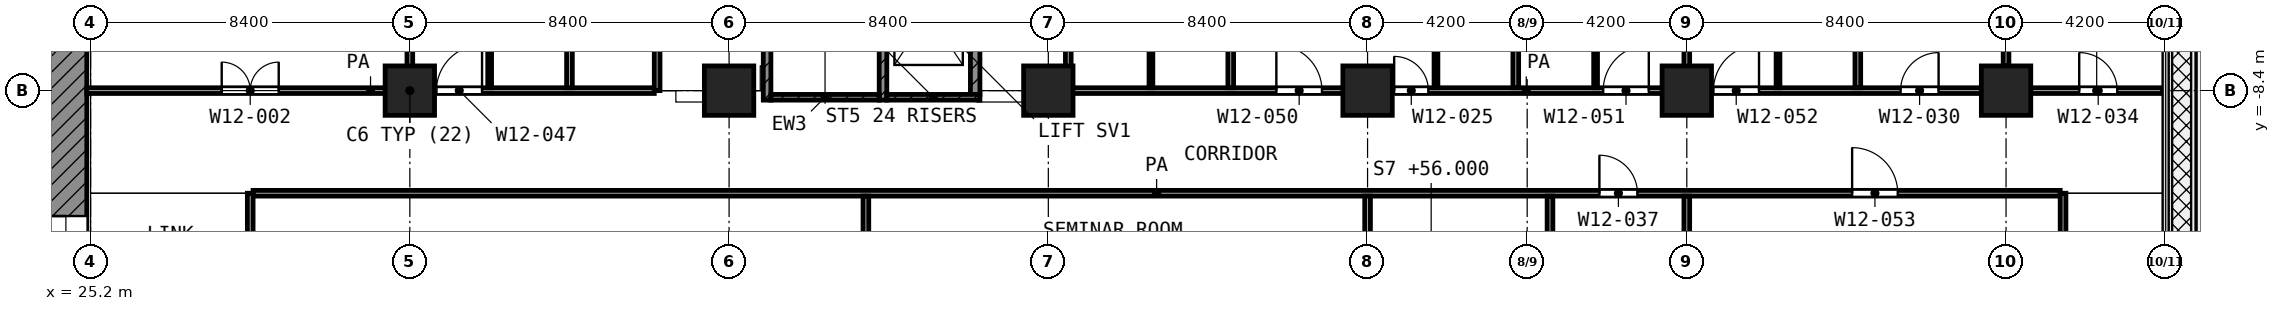
"""IFC4 building model, lengths in metres.
Left out: names, types, materials, properties, quantities, classifications, styles, units other than length and angle.
Written with IfcOpenShell. Run it as: python <this file> out.ifc"""

import sys

from ifc_helpers import new_model, si_unit, direction, frame, frame_2d, origin, origin_2d, place, context, subcontext, project, spatial, rectangle, extrude, element, fill, save


model = new_model("IFC4")
c1 = context("Model", 3, precision=1e-05, world=origin(), true_north=direction((0.0, 1.0)))
c2 = subcontext(c1, "Body", "Model", "MODEL_VIEW")
j1 = project(units=[si_unit("LENGTHUNIT", "METRE"), si_unit("PLANEANGLEUNIT", "RADIAN")], contexts=[c1])
p1 = place(None, origin())
s1 = spatial("IfcSite", under=j1, at=p1, CompositionType="ELEMENT")
p2 = place(p1, origin())
s2 = spatial("IfcBuilding", under=s1, at=p2, CompositionType="ELEMENT")
p3 = place(p2, frame((0.0, 0.0, 56.0)))
s3 = spatial("IfcBuildingStorey", under=s2, at=p3, CompositionType="ELEMENT", Elevation=56.0)
for number, where, z_axis, x_axis in (
    (1, (33.6, -8.4, 0.0), (0.0, 0.0, 1.0), (1.0, 0.0, 0.0)),
    (2, (42.0, -8.4, 0.0), (0.0, 0.0, 1.0), (1.0, 0.0, 0.0)),
    (3, (50.4, -8.4, 0.0), (0.0, 0.0, 1.0), (1.0, 0.0, 0.0)),
    (4, (58.8, -8.4, 0.0), (0.0, 0.0, 1.0), (1.0, 0.0, 0.0)),
    (5, (67.2, -8.4, 0.0), (0.0, 0.0, 1.0), (1.0, 0.0, 0.0)),
    (6, (75.6, -8.4, 0.0), (0.0, 0.0, 1.0), (1.0, 0.0, 0.0)),
):
    element("IfcColumn", number, at=place(p3, frame(where, z_axis=z_axis, x_axis=x_axis)), inside=s3, PredefinedType="COLUMN", context=c2, shape_type="SweptSolid", body=[
        extrude(rectangle(XDim=1.3, YDim=1.3, at=origin_2d()), origin(), (0.0, 0.0, 1.0), 4.2),
    ])
p4 = place(p3, frame((24.55, -24.0, 0.0), z_axis=(0.0, 0.0, 1.0), x_axis=(0.0, 1.0, 0.0)))
e7 = element("IfcWall", 7, at=p4, inside=s3, PredefinedType="SHEAR", context=c2, shape_type="SweptSolid", body=[
    extrude(rectangle(XDim=18.6, YDim=1.1, at=frame_2d((9.3, 0.0))), origin(), (0.0, 0.0, 1.0), 3.9),
])
p5 = place(p4, frame((10.5, 0.0, 0.0)))
e8 = element("IfcOpeningElement", 8, at=p5, cuts=e7, PredefinedType="OPENING", context=c2, shape_type="SweptSolid", body=[
    extrude(rectangle(XDim=1.8, YDim=2.1, at=frame_2d((0.9, 1.05))), frame((0.0, 0.56, 0.0), z_axis=(0.0, -1.0, 0.0), x_axis=(1.0, 0.0, 0.0)), (0.0, 0.0, 1.0), 1.12),
])
p6 = place(p3, frame((43.0, -8.65, 0.0), z_axis=(0.0, 0.0, 1.0), x_axis=(0.0, 1.0, 0.0)))
e9 = element("IfcWall", 9, at=p6, inside=s3, PredefinedType="SHEAR", context=c2, shape_type="SweptSolid", body=[
    extrude(rectangle(XDim=8.35, YDim=0.2, at=frame_2d((4.175, 0.0))), origin(), (0.0, 0.0, 1.0), 3.9),
])
p7 = place(p6, frame((7.0, 0.0, 0.0)))
e10 = element("IfcOpeningElement", 10, at=p7, cuts=e9, PredefinedType="OPENING", context=c2, shape_type="SweptSolid", body=[
    extrude(rectangle(XDim=1.1, YDim=2.1, at=frame_2d((0.55, 1.05))), frame((0.0, 0.11, 0.0), z_axis=(0.0, -1.0, 0.0), x_axis=(1.0, 0.0, 0.0)), (0.0, 0.0, 1.0), 0.22),
])
p8 = place(p3, frame((46.05, -8.65, 0.0), z_axis=(0.0, 0.0, 1.0), x_axis=(0.0, 1.0, 0.0)))
e11 = element("IfcWall", 11, at=p8, inside=s3, PredefinedType="SHEAR", context=c2, shape_type="SweptSolid", body=[
    extrude(rectangle(XDim=8.35, YDim=0.2, at=frame_2d((4.175, 0.0))), origin(), (0.0, 0.0, 1.0), 3.9),
])
p9 = place(p8, frame((7.0, 0.0, 0.0)))
e12 = element("IfcOpeningElement", 12, at=p9, cuts=e11, PredefinedType="OPENING", context=c2, shape_type="SweptSolid", body=[
    extrude(rectangle(XDim=1.1, YDim=2.1, at=frame_2d((0.55, 1.05))), frame((0.0, 0.11, 0.0), z_axis=(0.0, -1.0, 0.0), x_axis=(1.0, 0.0, 0.0)), (0.0, 0.0, 1.0), 0.22),
])
p10 = place(p3, frame((43.1, -8.575, 0.0), z_axis=(0.0, 0.0, 1.0), x_axis=(1.0, 0.0, 0.0)))
e13 = element("IfcWall", 13, at=p10, inside=s3, PredefinedType="SHEAR", context=c2, shape_type="SweptSolid", body=[
    extrude(rectangle(XDim=2.85, YDim=0.15, at=frame_2d((1.425, 0.0))), origin(), (0.0, 0.0, 1.0), 3.9),
])
p11 = place(p3, frame((46.15, -8.575, 0.0), z_axis=(0.0, 0.0, 1.0), x_axis=(1.0, 0.0, 0.0)))
e14 = element("IfcWall", 14, at=p11, inside=s3, PredefinedType="SHEAR", context=c2, shape_type="SweptSolid", body=[
    extrude(rectangle(XDim=2.45, YDim=0.15, at=frame_2d((1.225, 0.0))), origin(), (0.0, 0.0, 1.0), 3.9),
])
p12 = place(p3, frame((48.475, -8.5, 0.0), z_axis=(0.0, 0.0, 1.0), x_axis=(0.0, 1.0, 0.0)))
e15 = element("IfcWall", 15, at=p12, inside=s3, PredefinedType="SHEAR", context=c2, shape_type="SweptSolid", body=[
    extrude(rectangle(XDim=3.475, YDim=0.25, at=frame_2d((1.738, 0.0))), origin(), (0.0, 0.0, 1.0), 3.9),
])
for number, where, z_axis, x_axis in (
    (16, (35.7, -8.325, 0.0), (0.0, 0.0, 1.0), (0.0, 1.0, 0.0)),
    (17, (53.1, -8.325, 0.0), (0.0, 0.0, 1.0), (0.0, 1.0, 0.0)),
):
    element("IfcWall", number, at=place(p3, frame(where, z_axis=z_axis, x_axis=x_axis)), inside=s3, PredefinedType="PARTITIONING", context=c2, shape_type="SweptSolid", body=[
        extrude(rectangle(XDim=2.625, YDim=0.1, at=frame_2d((1.312, 0.0))), origin(), (0.0, 0.0, 1.0), 3.9),
    ])
p13 = place(p3, frame((60.6, -8.325, 0.0), z_axis=(0.0, 0.0, 1.0), x_axis=(0.0, 1.0, 0.0)))
e18 = element("IfcWall", 18, at=p13, inside=s3, PredefinedType="PARTITIONING", context=c2, shape_type="SweptSolid", body=[
    extrude(rectangle(XDim=2.624, YDim=0.1, at=frame_2d((1.312, 0.0))), origin(), (0.0, 0.0, 1.0), 3.9),
])
for number, where, z_axis, x_axis in (
    (19, (64.8, -8.325, 0.0), (0.0, 0.0, 1.0), (0.0, 1.0, 0.0)),
    (20, (69.6, -8.325, 0.0), (0.0, 0.0, 1.0), (0.0, 1.0, 0.0)),
):
    element("IfcWall", number, at=place(p3, frame(where, z_axis=z_axis, x_axis=x_axis)), inside=s3, PredefinedType="PARTITIONING", context=c2, shape_type="SweptSolid", body=[
        extrude(rectangle(XDim=2.625, YDim=0.1, at=frame_2d((1.312, 0.0))), origin(), (0.0, 0.0, 1.0), 3.9),
    ])
p14 = place(p3, frame((29.475, -11.1, 0.0), z_axis=(0.0, 0.0, 1.0), x_axis=(1.0, 0.0, 0.0)))
e21 = element("IfcWall", 21, at=p14, inside=s3, PredefinedType="PARTITIONING", context=c2, shape_type="SweptSolid", body=[
    extrude(rectangle(XDim=47.55, YDim=0.15, at=frame_2d((23.775, 0.0))), origin(), (0.0, 0.0, 1.0), 3.9),
])
p15 = place(p14, frame((35.425, 0.0, 0.0)))
e22 = element("IfcOpeningElement", 22, at=p15, cuts=e21, PredefinedType="OPENING", context=c2, shape_type="SweptSolid", body=[
    extrude(rectangle(XDim=1.0, YDim=2.1, at=frame_2d((0.5, 1.05))), frame((0.0, 0.085, 0.0), z_axis=(0.0, -1.0, 0.0), x_axis=(1.0, 0.0, 0.0)), (0.0, 0.0, 1.0), 0.17),
])
p16 = place(p14, frame((42.075, 0.0, 0.0)))
e23 = element("IfcOpeningElement", 23, at=p16, cuts=e21, PredefinedType="OPENING", context=c2, shape_type="SweptSolid", body=[
    extrude(rectangle(XDim=1.2, YDim=2.1, at=frame_2d((0.6, 1.05))), frame((0.0, 0.085, 0.0), z_axis=(0.0, -1.0, 0.0), x_axis=(1.0, 0.0, 0.0)), (0.0, 0.0, 1.0), 0.17),
])
p17 = place(p3, frame((25.1, -8.4, 0.0), z_axis=(0.0, 0.0, 1.0), x_axis=(1.0, 0.0, 0.0)))
e24 = element("IfcWall", 24, at=p17, inside=s3, PredefinedType="PARTITIONING", context=c2, shape_type="SweptSolid", body=[
    extrude(rectangle(XDim=14.932, YDim=0.15, at=frame_2d((7.466, 0.0))), origin(), (0.0, 0.0, 1.0), 3.9),
])
p18 = place(p17, frame((3.55, 0.0, 0.0)))
e25 = element("IfcOpeningElement", 25, at=p18, cuts=e24, PredefinedType="OPENING", context=c2, shape_type="SweptSolid", body=[
    extrude(rectangle(XDim=1.5, YDim=2.1, at=frame_2d((0.75, 1.05))), frame((0.0, 0.085, 0.0), z_axis=(0.0, -1.0, 0.0), x_axis=(1.0, 0.0, 0.0)), (0.0, 0.0, 1.0), 0.17),
])
p19 = place(p17, frame((9.2, 0.0, 0.0)))
e26 = element("IfcOpeningElement", 26, at=p19, cuts=e24, PredefinedType="OPENING", context=c2, shape_type="SweptSolid", body=[
    extrude(rectangle(XDim=1.2, YDim=2.1, at=frame_2d((0.6, 1.05))), frame((0.0, 0.085, 0.0), z_axis=(0.0, -1.0, 0.0), x_axis=(1.0, 0.0, 0.0)), (0.0, 0.0, 1.0), 0.17),
])
p20 = place(p3, frame((51.0, -8.4, 0.0), z_axis=(0.0, 0.0, 1.0), x_axis=(1.0, 0.0, 0.0)))
e27 = element("IfcWall", 27, at=p20, inside=s3, PredefinedType="PARTITIONING", context=c2, shape_type="SweptSolid", body=[
    extrude(rectangle(XDim=23.95, YDim=0.15, at=frame_2d((11.975, 0.0))), origin(), (0.0, 0.0, 1.0), 3.9),
])
p21 = place(p20, frame((5.4, 0.0, 0.0)))
e28 = element("IfcOpeningElement", 28, at=p21, cuts=e27, PredefinedType="OPENING", context=c2, shape_type="SweptSolid", body=[
    extrude(rectangle(XDim=1.2, YDim=2.1, at=frame_2d((0.6, 1.05))), frame((0.0, 0.085, 0.0), z_axis=(0.0, -1.0, 0.0), x_axis=(1.0, 0.0, 0.0)), (0.0, 0.0, 1.0), 0.17),
])
p22 = place(p20, frame((8.5, 0.0, 0.0)))
e29 = element("IfcOpeningElement", 29, at=p22, cuts=e27, PredefinedType="OPENING", context=c2, shape_type="SweptSolid", body=[
    extrude(rectangle(XDim=0.9, YDim=2.1, at=frame_2d((0.45, 1.05))), frame((0.0, 0.085, 0.0), z_axis=(0.0, -1.0, 0.0), x_axis=(1.0, 0.0, 0.0)), (0.0, 0.0, 1.0), 0.17),
])
p23 = place(p20, frame((14.0, 0.0, 0.0)))
e30 = element("IfcOpeningElement", 30, at=p23, cuts=e27, PredefinedType="OPENING", context=c2, shape_type="SweptSolid", body=[
    extrude(rectangle(XDim=1.2, YDim=2.1, at=frame_2d((0.6, 1.05))), frame((0.0, 0.085, 0.0), z_axis=(0.0, -1.0, 0.0), x_axis=(1.0, 0.0, 0.0)), (0.0, 0.0, 1.0), 0.17),
])
p24 = place(p20, frame((16.9, 0.0, 0.0)))
e31 = element("IfcOpeningElement", 31, at=p24, cuts=e27, PredefinedType="OPENING", context=c2, shape_type="SweptSolid", body=[
    extrude(rectangle(XDim=1.2, YDim=2.1, at=frame_2d((0.6, 1.05))), frame((0.0, 0.085, 0.0), z_axis=(0.0, -1.0, 0.0), x_axis=(1.0, 0.0, 0.0)), (0.0, 0.0, 1.0), 0.17),
])
p25 = place(p20, frame((21.825, 0.0, 0.0)))
e32 = element("IfcOpeningElement", 32, at=p25, cuts=e27, PredefinedType="OPENING", context=c2, shape_type="SweptSolid", body=[
    extrude(rectangle(XDim=1.0, YDim=2.1, at=frame_2d((0.5, 1.05))), frame((0.0, 0.085, 0.0), z_axis=(0.0, -1.0, 0.0), x_axis=(1.0, 0.0, 0.0)), (0.0, 0.0, 1.0), 0.17),
])
p26 = place(p3, frame((76.25, -8.4, 0.0), z_axis=(0.0, 0.0, 1.0), x_axis=(1.0, 0.0, 0.0)))
e33 = element("IfcWall", 33, at=p26, inside=s3, PredefinedType="PARTITIONING", context=c2, shape_type="SweptSolid", body=[
    extrude(rectangle(XDim=3.47, YDim=0.15, at=frame_2d((1.735, 0.0))), origin(), (0.0, 0.0, 1.0), 3.9),
])
p27 = place(p26, frame((1.275, 0.0, 0.0)))
e34 = element("IfcOpeningElement", 34, at=p27, cuts=e33, PredefinedType="OPENING", context=c2, shape_type="SweptSolid", body=[
    extrude(rectangle(XDim=1.0, YDim=2.1, at=frame_2d((0.5, 1.05))), frame((0.0, 0.085, 0.0), z_axis=(0.0, -1.0, 0.0), x_axis=(1.0, 0.0, 0.0)), (0.0, 0.0, 1.0), 0.17),
])
p28 = place(p3, frame((29.4, -14.1, 0.0), z_axis=(0.0, 0.0, 1.0), x_axis=(0.0, 1.0, 0.0)))
e35 = element("IfcWall", 35, at=p28, inside=s3, PredefinedType="PARTITIONING", context=c2, shape_type="SweptSolid", body=[
    extrude(rectangle(XDim=3.0, YDim=0.15, at=frame_2d((1.5, 0.0))), origin(), (0.0, 0.0, 1.0), 3.9),
])
for number, where, z_axis, x_axis in (
    (36, (33.6, -8.325, 0.0), (0.0, 0.0, 1.0), (0.0, 1.0, 0.0)),
    (37, (37.8, -8.325, 0.0), (0.0, 0.0, 1.0), (0.0, 1.0, 0.0)),
):
    element("IfcWall", number, at=place(p3, frame(where, z_axis=z_axis, x_axis=x_axis)), inside=s3, PredefinedType="PARTITIONING", context=c2, shape_type="SweptSolid", body=[
        extrude(rectangle(XDim=8.245, YDim=0.15, at=frame_2d((4.123, 0.0))), origin(), (0.0, 0.0, 1.0), 3.9),
    ])
p29 = place(p3, frame((40.107, -8.4, 0.0), z_axis=(0.0, 0.0, 1.0), x_axis=(0.0, 1.0, 0.0)))
e38 = element("IfcWall", 38, at=p29, inside=s3, PredefinedType="PARTITIONING", context=c2, shape_type="SweptSolid", body=[
    extrude(rectangle(XDim=8.048, YDim=0.15, at=frame_2d((4.024, 0.0))), origin(), (0.0, 0.0, 1.0), 3.9),
])
p30 = place(p29, frame((3.524, 0.0, 0.0)))
e39 = element("IfcOpeningElement", 39, at=p30, cuts=e38, PredefinedType="OPENING", context=c2, shape_type="SweptSolid", body=[
    extrude(rectangle(XDim=1.0, YDim=2.1, at=frame_2d((0.5, 1.05))), frame((0.0, 0.085, 0.0), z_axis=(0.0, -1.0, 0.0), x_axis=(1.0, 0.0, 0.0)), (0.0, 0.0, 1.0), 0.17),
])
p31 = place(p3, frame((45.6, -14.025, 0.0), z_axis=(0.0, 0.0, 1.0), x_axis=(0.0, 1.0, 0.0)))
e40 = element("IfcWall", 40, at=p31, inside=s3, PredefinedType="PARTITIONING", context=c2, shape_type="SweptSolid", body=[
    extrude(rectangle(XDim=2.85, YDim=0.15, at=frame_2d((1.425, 0.0))), origin(), (0.0, 0.0, 1.0), 3.9),
])
p32 = place(p3, frame((50.925, -8.4, 0.0), z_axis=(0.0, 0.0, 1.0), x_axis=(0.0, 1.0, 0.0)))
e41 = element("IfcWall", 41, at=p32, inside=s3, PredefinedType="PARTITIONING", context=c2, shape_type="SweptSolid", body=[
    extrude(rectangle(XDim=6.55, YDim=0.15, at=frame_2d((3.275, 0.0))), origin(), (0.0, 0.0, 1.0), 3.9),
])
p33 = place(p32, frame((3.767, 0.0, 0.0)))
e42 = element("IfcOpeningElement", 42, at=p33, cuts=e41, PredefinedType="OPENING", context=c2, shape_type="SweptSolid", body=[
    extrude(rectangle(XDim=1.2, YDim=2.1, at=frame_2d((0.6, 1.05))), frame((0.0, 0.085, 0.0), z_axis=(0.0, -1.0, 0.0), x_axis=(1.0, 0.0, 0.0)), (0.0, 0.0, 1.0), 0.17),
])
p34 = place(p32, frame((1.583, 0.0, 0.0)))
e43 = element("IfcOpeningElement", 43, at=p34, cuts=e41, PredefinedType="OPENING", context=c2, shape_type="SweptSolid", body=[
    extrude(rectangle(XDim=1.2, YDim=2.1, at=frame_2d((0.6, 1.05))), frame((0.0, 0.085, 0.0), z_axis=(0.0, -1.0, 0.0), x_axis=(1.0, 0.0, 0.0)), (0.0, 0.0, 1.0), 0.17),
])
p35 = place(p3, frame((55.2, -8.325, 0.0), z_axis=(0.0, 0.0, 1.0), x_axis=(0.0, 1.0, 0.0)))
e44 = element("IfcWall", 44, at=p35, inside=s3, PredefinedType="PARTITIONING", context=c2, shape_type="SweptSolid", body=[
    extrude(rectangle(XDim=8.245, YDim=0.15, at=frame_2d((4.123, 0.0))), origin(), (0.0, 0.0, 1.0), 3.9),
])
p36 = place(p3, frame((58.8, -14.025, 0.0), z_axis=(0.0, 0.0, 1.0), x_axis=(0.0, 1.0, 0.0)))
e45 = element("IfcWall", 45, at=p36, inside=s3, PredefinedType="PARTITIONING", context=c2, shape_type="SweptSolid", body=[
    extrude(rectangle(XDim=2.85, YDim=0.15, at=frame_2d((1.425, 0.0))), origin(), (0.0, 0.0, 1.0), 3.9),
])
p37 = place(p3, frame((62.7, -8.325, 0.0), z_axis=(0.0, 0.0, 1.0), x_axis=(0.0, 1.0, 0.0)))
e46 = element("IfcWall", 46, at=p37, inside=s3, PredefinedType="PARTITIONING", context=c2, shape_type="SweptSolid", body=[
    extrude(rectangle(XDim=8.245, YDim=0.15, at=frame_2d((4.123, 0.0))), origin(), (0.0, 0.0, 1.0), 3.9),
])
for number, where, z_axis, x_axis in (
    (47, (63.6, -14.025, 0.0), (0.0, 0.0, 1.0), (0.0, 1.0, 0.0)),
    (48, (67.2, -14.025, 0.0), (0.0, 0.0, 1.0), (0.0, 1.0, 0.0)),
):
    element("IfcWall", number, at=place(p3, frame(where, z_axis=z_axis, x_axis=x_axis)), inside=s3, PredefinedType="PARTITIONING", context=c2, shape_type="SweptSolid", body=[
        extrude(rectangle(XDim=2.85, YDim=0.15, at=frame_2d((1.425, 0.0))), origin(), (0.0, 0.0, 1.0), 3.9),
    ])
for number, where, z_axis, x_axis in (
    (49, (67.2, -8.325, 0.0), (0.0, 0.0, 1.0), (0.0, 1.0, 0.0)),
    (50, (71.7, -8.325, 0.0), (0.0, 0.0, 1.0), (0.0, 1.0, 0.0)),
):
    element("IfcWall", number, at=place(p3, frame(where, z_axis=z_axis, x_axis=x_axis)), inside=s3, PredefinedType="PARTITIONING", context=c2, shape_type="SweptSolid", body=[
        extrude(rectangle(XDim=8.245, YDim=0.15, at=frame_2d((4.123, 0.0))), origin(), (0.0, 0.0, 1.0), 3.9),
    ])
p38 = place(p3, frame((75.6, -7.75, 0.0), z_axis=(0.0, 0.0, 1.0), x_axis=(0.0, 1.0, 0.0)))
e51 = element("IfcWall", 51, at=p38, inside=s3, PredefinedType="PARTITIONING", context=c2, shape_type="SweptSolid", body=[
    extrude(rectangle(XDim=5.837, YDim=0.15, at=frame_2d((2.918, 0.0))), origin(), (0.0, 0.0, 1.0), 3.9),
])
p39 = place(p3, frame((77.1, -14.1, 0.0), z_axis=(0.0, 0.0, 1.0), x_axis=(0.0, 1.0, 0.0)))
e52 = element("IfcWall", 52, at=p39, inside=s3, PredefinedType="PARTITIONING", context=c2, shape_type="SweptSolid", body=[
    extrude(rectangle(XDim=3.0, YDim=0.15, at=frame_2d((1.5, 0.0))), origin(), (0.0, 0.0, 1.0), 3.9),
])
p40 = place(p5, origin())
e53 = element("IfcDoor", 53, at=p40, inside=s3, OperationType="DOUBLE_DOOR_SINGLE_SWING", PredefinedType="DOOR", context=c2, shape_type="SweptSolid", body=[
    extrude(rectangle(XDim=1.8, YDim=2.1, at=frame_2d((0.9, 1.05))), frame((0.0, 0.025, 0.0), z_axis=(0.0, -1.0, 0.0), x_axis=(1.0, 0.0, 0.0)), (0.0, 0.0, 1.0), 0.05),
])
fill(e8, e53)
p41 = place(p18, origin())
e54 = element("IfcDoor", 54, at=p41, inside=s3, OperationType="DOUBLE_DOOR_SINGLE_SWING", PredefinedType="DOOR", context=c2, shape_type="SweptSolid", body=[
    extrude(rectangle(XDim=1.5, YDim=2.1, at=frame_2d((0.75, 1.05))), frame((0.0, 0.025, 0.0), z_axis=(0.0, -1.0, 0.0), x_axis=(1.0, 0.0, 0.0)), (0.0, 0.0, 1.0), 0.05),
])
fill(e25, e54)
p42 = place(p19, origin())
e55 = element("IfcDoor", 55, at=p42, inside=s3, OperationType="SINGLE_SWING_RIGHT", PredefinedType="DOOR", context=c2, shape_type="SweptSolid", body=[
    extrude(rectangle(XDim=1.2, YDim=2.1, at=frame_2d((0.6, 1.05))), frame((0.0, 0.025, 0.0), z_axis=(0.0, -1.0, 0.0), x_axis=(1.0, 0.0, 0.0)), (0.0, 0.0, 1.0), 0.05),
])
fill(e26, e55)
p43 = place(p21, origin())
e56 = element("IfcDoor", 56, at=p43, inside=s3, OperationType="SINGLE_SWING_LEFT", PredefinedType="DOOR", context=c2, shape_type="SweptSolid", body=[
    extrude(rectangle(XDim=1.2, YDim=2.1, at=frame_2d((0.6, 1.05))), frame((0.0, 0.025, 0.0), z_axis=(0.0, -1.0, 0.0), x_axis=(1.0, 0.0, 0.0)), (0.0, 0.0, 1.0), 0.05),
])
fill(e28, e56)
p44 = place(p22, origin())
e57 = element("IfcDoor", 57, at=p44, inside=s3, OperationType="SINGLE_SWING_LEFT", PredefinedType="DOOR", context=c2, shape_type="SweptSolid", body=[
    extrude(rectangle(XDim=0.9, YDim=2.1, at=frame_2d((0.45, 1.05))), frame((0.0, 0.025, 0.0), z_axis=(0.0, -1.0, 0.0), x_axis=(1.0, 0.0, 0.0)), (0.0, 0.0, 1.0), 0.05),
])
fill(e29, e57)
p45 = place(p23, origin())
e58 = element("IfcDoor", 58, at=p45, inside=s3, OperationType="SINGLE_SWING_RIGHT", PredefinedType="DOOR", context=c2, shape_type="SweptSolid", body=[
    extrude(rectangle(XDim=1.2, YDim=2.1, at=frame_2d((0.6, 1.05))), frame((0.0, 0.025, 0.0), z_axis=(0.0, -1.0, 0.0), x_axis=(1.0, 0.0, 0.0)), (0.0, 0.0, 1.0), 0.05),
])
fill(e30, e58)
p46 = place(p24, origin())
e59 = element("IfcDoor", 59, at=p46, inside=s3, OperationType="SINGLE_SWING_RIGHT", PredefinedType="DOOR", context=c2, shape_type="SweptSolid", body=[
    extrude(rectangle(XDim=1.2, YDim=2.1, at=frame_2d((0.6, 1.05))), frame((0.0, 0.025, 0.0), z_axis=(0.0, -1.0, 0.0), x_axis=(1.0, 0.0, 0.0)), (0.0, 0.0, 1.0), 0.05),
])
fill(e31, e59)
p47 = place(p25, origin())
e60 = element("IfcDoor", 60, at=p47, inside=s3, OperationType="SINGLE_SWING_RIGHT", PredefinedType="DOOR", context=c2, shape_type="SweptSolid", body=[
    extrude(rectangle(XDim=1.0, YDim=2.1, at=frame_2d((0.5, 1.05))), frame((0.0, 0.025, 0.0), z_axis=(0.0, -1.0, 0.0), x_axis=(1.0, 0.0, 0.0)), (0.0, 0.0, 1.0), 0.05),
])
fill(e32, e60)
p48 = place(p27, origin())
e61 = element("IfcDoor", 61, at=p48, inside=s3, OperationType="SINGLE_SWING_LEFT", PredefinedType="DOOR", context=c2, shape_type="SweptSolid", body=[
    extrude(rectangle(XDim=1.0, YDim=2.1, at=frame_2d((0.5, 1.05))), frame((0.0, 0.025, 0.0), z_axis=(0.0, -1.0, 0.0), x_axis=(1.0, 0.0, 0.0)), (0.0, 0.0, 1.0), 0.05),
])
fill(e34, e61)
p49 = place(p15, origin())
e62 = element("IfcDoor", 62, at=p49, inside=s3, OperationType="SINGLE_SWING_LEFT", PredefinedType="DOOR", context=c2, shape_type="SweptSolid", body=[
    extrude(rectangle(XDim=1.0, YDim=2.1, at=frame_2d((0.5, 1.05))), frame((0.0, 0.025, 0.0), z_axis=(0.0, -1.0, 0.0), x_axis=(1.0, 0.0, 0.0)), (0.0, 0.0, 1.0), 0.05),
])
fill(e22, e62)
p50 = place(p16, origin())
e63 = element("IfcDoor", 63, at=p50, inside=s3, OperationType="SINGLE_SWING_LEFT", PredefinedType="DOOR", context=c2, shape_type="SweptSolid", body=[
    extrude(rectangle(XDim=1.2, YDim=2.1, at=frame_2d((0.6, 1.05))), frame((0.0, 0.025, 0.0), z_axis=(0.0, -1.0, 0.0), x_axis=(1.0, 0.0, 0.0)), (0.0, 0.0, 1.0), 0.05),
])
fill(e23, e63)
save(model, sys.argv[1])
